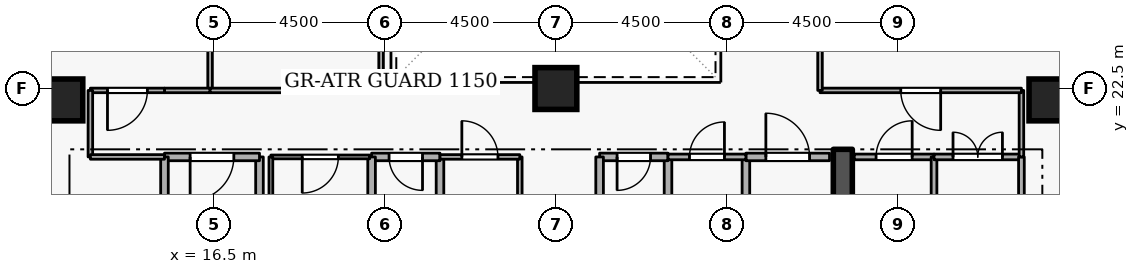
"""IFC4 building model, lengths in metres.
Left out: names, types, materials, properties, quantities, classifications, styles, units other than length and angle.
Written with IfcOpenShell. Run it as: python <this file> out.ifc"""

import sys

from ifc_helpers import new_model, si_unit, direction, frame, frame_2d, origin, origin_2d, place, context, subcontext, project, spatial, rectangle, extrude, element, fill, save


model = new_model("IFC4")
c1 = context("Model", 3, precision=1e-05, world=origin(), true_north=direction((0.0, 1.0)))
c2 = subcontext(c1, "Body", "Model", "MODEL_VIEW")
j1 = project(units=[si_unit("LENGTHUNIT", "METRE"), si_unit("PLANEANGLEUNIT", "RADIAN")], contexts=[c1])
p1 = place(None, origin())
s1 = spatial("IfcSite", under=j1, at=p1, CompositionType="ELEMENT")
p2 = place(p1, origin())
s2 = spatial("IfcBuilding", under=s1, at=p2, CompositionType="ELEMENT")
p3 = place(p2, frame((0.0, 0.0, 189.3)))
s3 = spatial("IfcBuildingStorey", under=s2, at=p3, CompositionType="ELEMENT", Elevation=189.3)
p4 = place(p3, frame((33.05, 15.1, 0.0), z_axis=(0.0, 0.0, 1.0), x_axis=(0.0, 1.0, 0.0)))
e1 = element("IfcWall", 1, at=p4, inside=s3, PredefinedType="SHEAR", context=c2, shape_type="SweptSolid", body=[
    extrude(rectangle(XDim=5.8, YDim=0.5, at=frame_2d((2.9, 0.0))), origin(), (0.0, 0.0, 1.0), 3.6),
])
for number, where, z_axis, x_axis in (
    (2, (12.5, 22.2, 0.0), (0.0, 0.0, 1.0), (1.0, 0.0, 0.0)),
    (3, (38.5, 22.2, 0.0), (0.0, 0.0, 1.0), (1.0, 0.0, 0.0)),
    (4, (25.5, 22.5, 0.0), (0.0, 0.0, 1.0), (1.0, 0.0, 0.0)),
):
    element("IfcColumn", number, at=place(p3, frame(where, z_axis=z_axis, x_axis=x_axis)), inside=s3, PredefinedType="COLUMN", context=c2, shape_type="SweptSolid", body=[
        extrude(rectangle(XDim=1.1, YDim=1.1, at=origin_2d()), origin(), (0.0, 0.0, 1.0), 3.6),
    ])
p5 = place(p3, frame((17.7, 18.4, 0.0), z_axis=(0.0, 0.0, 1.0), x_axis=(0.0, 1.0, 0.0)))
e5 = element("IfcWall", 5, at=p5, inside=s3, PredefinedType="STANDARD", context=c2, shape_type="SweptSolid", body=[
    extrude(rectangle(XDim=2.3, YDim=0.2, at=frame_2d((1.15, 0.0))), origin(), (0.0, 0.0, 1.0), 2.545),
])
p6 = place(p3, frame((17.7, 20.7, 0.0), z_axis=(0.0, 0.0, 1.0), x_axis=(-1.0, 0.0, 0.0)))
e6 = element("IfcWall", 6, at=p6, inside=s3, PredefinedType="STANDARD", context=c2, shape_type="SweptSolid", body=[
    extrude(rectangle(XDim=2.5, YDim=0.2, at=frame_2d((1.25, 0.0))), origin(), (0.0, 0.0, 1.0), 3.34),
])
p7 = place(p6, frame((0.675, 0.0, 0.0)))
e7 = element("IfcOpeningElement", 7, at=p7, cuts=e6, PredefinedType="OPENING", context=c2, shape_type="SweptSolid", body=[
    extrude(rectangle(XDim=1.15, YDim=2.1, at=frame_2d((0.575, 1.05))), frame((0.0, 0.11, 0.0), z_axis=(0.0, -1.0, 0.0), x_axis=(1.0, 0.0, 0.0)), (0.0, 0.0, 1.0), 0.22),
])
p8 = place(p3, frame((15.2, 20.7, 0.0), z_axis=(0.0, 0.0, 1.0), x_axis=(0.0, -1.0, 0.0)))
e8 = element("IfcWall", 8, at=p8, inside=s3, PredefinedType="STANDARD", context=c2, shape_type="SweptSolid", body=[
    extrude(rectangle(XDim=5.7, YDim=0.2, at=frame_2d((2.85, 0.0))), origin(), (0.0, 0.0, 1.0), 3.34),
])
p9 = place(p3, frame((28.45, 18.65, 0.0), z_axis=(0.0, 0.0, 1.0), x_axis=(0.0, 1.0, 0.0)))
e9 = element("IfcWall", 9, at=p9, inside=s3, PredefinedType="STANDARD", context=c2, shape_type="SweptSolid", body=[
    extrude(rectangle(XDim=2.05, YDim=0.2, at=frame_2d((1.025, 0.0))), origin(), (0.0, 0.0, 1.0), 3.34),
])
p10 = place(p3, frame((28.45, 20.7, 0.0), z_axis=(0.0, 0.0, 1.0), x_axis=(-1.0, 0.0, 0.0)))
e10 = element("IfcWall", 10, at=p10, inside=s3, PredefinedType="STANDARD", context=c2, shape_type="SweptSolid", body=[
    extrude(rectangle(XDim=1.8, YDim=0.2, at=frame_2d((0.9, 0.0))), origin(), (0.0, 0.0, 1.0), 3.34),
])
p11 = place(p10, frame((0.46, 0.0, 0.0)))
e11 = element("IfcOpeningElement", 11, at=p11, cuts=e10, PredefinedType="OPENING", context=c2, shape_type="SweptSolid", body=[
    extrude(rectangle(XDim=0.88, YDim=2.04, at=frame_2d((0.44, 1.02))), frame((0.0, 0.11, 0.0), z_axis=(0.0, -1.0, 0.0), x_axis=(1.0, 0.0, 0.0)), (0.0, 0.0, 1.0), 0.22),
])
for number, where, z_axis, x_axis in (
    (12, (26.65, 20.7, 0.0), (0.0, 0.0, 1.0), (0.0, -1.0, 0.0)),
    (13, (22.45, 18.65, 0.0), (0.0, 0.0, 1.0), (0.0, 1.0, 0.0)),
):
    element("IfcWall", number, at=place(p3, frame(where, z_axis=z_axis, x_axis=x_axis)), inside=s3, PredefinedType="STANDARD", context=c2, shape_type="SweptSolid", body=[
        extrude(rectangle(XDim=2.05, YDim=0.2, at=frame_2d((1.025, 0.0))), origin(), (0.0, 0.0, 1.0), 3.34),
    ])
p12 = place(p3, frame((22.45, 20.7, 0.0), z_axis=(0.0, 0.0, 1.0), x_axis=(-1.0, 0.0, 0.0)))
e14 = element("IfcWall", 14, at=p12, inside=s3, PredefinedType="STANDARD", context=c2, shape_type="SweptSolid", body=[
    extrude(rectangle(XDim=1.8, YDim=0.2, at=frame_2d((0.9, 0.0))), origin(), (0.0, 0.0, 1.0), 3.34),
])
p13 = place(p12, frame((0.46, 0.0, 0.0)))
e15 = element("IfcOpeningElement", 15, at=p13, cuts=e14, PredefinedType="OPENING", context=c2, shape_type="SweptSolid", body=[
    extrude(rectangle(XDim=0.88, YDim=2.04, at=frame_2d((0.44, 1.02))), frame((0.0, 0.11, 0.0), z_axis=(0.0, -1.0, 0.0), x_axis=(1.0, 0.0, 0.0)), (0.0, 0.0, 1.0), 0.22),
])
for number, where, z_axis, x_axis in (
    (16, (20.65, 20.7, 0.0), (0.0, 0.0, 1.0), (0.0, -1.0, 0.0)),
    (17, (30.5, 18.65, 0.0), (0.0, 0.0, 1.0), (0.0, 1.0, 0.0)),
):
    element("IfcWall", number, at=place(p3, frame(where, z_axis=z_axis, x_axis=x_axis)), inside=s3, PredefinedType="STANDARD", context=c2, shape_type="SweptSolid", body=[
        extrude(rectangle(XDim=2.05, YDim=0.2, at=frame_2d((1.025, 0.0))), origin(), (0.0, 0.0, 1.0), 3.34),
    ])
p14 = place(p3, frame((30.5, 20.7, 0.0), z_axis=(0.0, 0.0, 1.0), x_axis=(1.0, 0.0, 0.0)))
e18 = element("IfcWall", 18, at=p14, inside=s3, PredefinedType="STANDARD", context=c2, shape_type="SweptSolid", body=[
    extrude(rectangle(XDim=2.2, YDim=0.2, at=frame_2d((1.1, 0.0))), origin(), (0.0, 0.0, 1.0), 3.34),
])
p15 = place(p14, frame((0.525, 0.0, 0.0)))
e19 = element("IfcOpeningElement", 19, at=p15, cuts=e18, PredefinedType="OPENING", context=c2, shape_type="SweptSolid", body=[
    extrude(rectangle(XDim=1.15, YDim=2.1, at=frame_2d((0.575, 1.05))), frame((0.0, 0.11, 0.0), z_axis=(0.0, -1.0, 0.0), x_axis=(1.0, 0.0, 0.0)), (0.0, 0.0, 1.0), 0.22),
])
p16 = place(p3, frame((20.6, 20.7, 0.0), z_axis=(0.0, 0.0, 1.0), x_axis=(-1.0, 0.0, 0.0)))
e20 = element("IfcWall", 20, at=p16, inside=s3, PredefinedType="PARTITIONING", context=c2, shape_type="SweptSolid", body=[
    extrude(rectangle(XDim=2.6, YDim=0.1, at=frame_2d((1.3, 0.0))), origin(), (0.0, 0.0, 1.0), 3.34),
])
p17 = place(p16, frame((0.825, 0.0, 0.0)))
e21 = element("IfcOpeningElement", 21, at=p17, cuts=e20, PredefinedType="OPENING", context=c2, shape_type="SweptSolid", body=[
    extrude(rectangle(XDim=0.95, YDim=2.1, at=frame_2d((0.475, 1.05))), frame((0.0, 0.06, 0.0), z_axis=(0.0, -1.0, 0.0), x_axis=(1.0, 0.0, 0.0)), (0.0, 0.0, 1.0), 0.12),
])
p18 = place(p3, frame((18.0, 20.7, 0.0), z_axis=(0.0, 0.0, 1.0), x_axis=(0.0, -1.0, 0.0)))
e22 = element("IfcWall", 22, at=p18, inside=s3, PredefinedType="PARTITIONING", context=c2, shape_type="SweptSolid", body=[
    extrude(rectangle(XDim=2.05, YDim=0.1, at=frame_2d((1.025, 0.0))), origin(), (0.0, 0.0, 1.0), 2.545),
])
p19 = place(p3, frame((24.55, 20.7, 0.0), z_axis=(0.0, 0.0, 1.0), x_axis=(0.0, -1.0, 0.0)))
e23 = element("IfcWall", 23, at=p19, inside=s3, PredefinedType="PARTITIONING", context=c2, shape_type="SweptSolid", body=[
    extrude(rectangle(XDim=2.05, YDim=0.12, at=frame_2d((1.025, 0.0))), origin(), (0.0, 0.0, 1.0), 3.34),
])
p20 = place(p3, frame((22.45, 20.7, 0.0), z_axis=(0.0, 0.0, 1.0), x_axis=(1.0, 0.0, 0.0)))
e24 = element("IfcWall", 24, at=p20, inside=s3, PredefinedType="PARTITIONING", context=c2, shape_type="SweptSolid", body=[
    extrude(rectangle(XDim=2.1, YDim=0.12, at=frame_2d((1.05, 0.0))), origin(), (0.0, 0.0, 1.0), 3.34),
])
p21 = place(p20, frame((0.575, 0.0, 0.0)))
e25 = element("IfcOpeningElement", 25, at=p21, cuts=e24, PredefinedType="OPENING", context=c2, shape_type="SweptSolid", body=[
    extrude(rectangle(XDim=0.95, YDim=2.1, at=frame_2d((0.475, 1.05))), frame((0.0, 0.07, 0.0), z_axis=(0.0, -1.0, 0.0), x_axis=(1.0, 0.0, 0.0)), (0.0, 0.0, 1.0), 0.14),
])
p22 = place(p3, frame((28.45, 20.7, 0.0), z_axis=(0.0, 0.0, 1.0), x_axis=(1.0, 0.0, 0.0)))
e26 = element("IfcWall", 26, at=p22, inside=s3, PredefinedType="PARTITIONING", context=c2, shape_type="SweptSolid", body=[
    extrude(rectangle(XDim=2.05, YDim=0.15, at=frame_2d((1.025, 0.0))), origin(), (0.0, 0.0, 1.0), 3.34),
])
p23 = place(p22, frame((0.565, 0.0, 0.0)))
e27 = element("IfcOpeningElement", 27, at=p23, cuts=e26, PredefinedType="OPENING", context=c2, shape_type="SweptSolid", body=[
    extrude(rectangle(XDim=0.92, YDim=2.08, at=frame_2d((0.46, 1.04))), frame((0.0, 0.085, 0.0), z_axis=(0.0, -1.0, 0.0), x_axis=(1.0, 0.0, 0.0)), (0.0, 0.0, 1.0), 0.17),
])
p24 = place(p3, frame((33.35, 20.7, 0.0), z_axis=(0.0, 0.0, 1.0), x_axis=(1.0, 0.0, 0.0)))
e28 = element("IfcWall", 28, at=p24, inside=s3, PredefinedType="PARTITIONING", context=c2, shape_type="SweptSolid", body=[
    extrude(rectangle(XDim=2.1, YDim=0.15, at=frame_2d((1.05, 0.0))), origin(), (0.0, 0.0, 1.0), 3.34),
])
p25 = place(p24, frame((0.575, 0.0, 0.0)))
e29 = element("IfcOpeningElement", 29, at=p25, cuts=e28, PredefinedType="OPENING", context=c2, shape_type="SweptSolid", body=[
    extrude(rectangle(XDim=0.95, YDim=2.1, at=frame_2d((0.475, 1.05))), frame((0.0, 0.085, 0.0), z_axis=(0.0, -1.0, 0.0), x_axis=(1.0, 0.0, 0.0)), (0.0, 0.0, 1.0), 0.17),
])
p26 = place(p3, frame((35.45, 20.7, 0.0), z_axis=(0.0, 0.0, 1.0), x_axis=(0.0, -1.0, 0.0)))
e30 = element("IfcWall", 30, at=p26, inside=s3, PredefinedType="PARTITIONING", context=c2, shape_type="SweptSolid", body=[
    extrude(rectangle(XDim=5.65, YDim=0.15, at=frame_2d((2.825, 0.0))), origin(), (0.0, 0.0, 1.0), 3.34),
])
p27 = place(p3, frame((35.45, 20.7, 0.0), z_axis=(0.0, 0.0, 1.0), x_axis=(1.0, 0.0, 0.0)))
e31 = element("IfcWall", 31, at=p27, inside=s3, PredefinedType="PARTITIONING", context=c2, shape_type="SweptSolid", body=[
    extrude(rectangle(XDim=2.3, YDim=0.15, at=frame_2d((1.15, 0.0))), origin(), (0.0, 0.0, 1.0), 3.34),
])
p28 = place(p27, frame((0.5, 0.0, 0.0)))
e32 = element("IfcOpeningElement", 32, at=p28, cuts=e31, PredefinedType="OPENING", context=c2, shape_type="SweptSolid", body=[
    extrude(rectangle(XDim=1.3, YDim=2.12, at=frame_2d((0.65, 1.06))), frame((0.0, 0.085, 0.0), z_axis=(0.0, -1.0, 0.0), x_axis=(1.0, 0.0, 0.0)), (0.0, 0.0, 1.0), 0.17),
])
p29 = place(p3, frame((37.75, 20.7, 0.0), z_axis=(0.0, 0.0, 1.0), x_axis=(0.0, -1.0, 0.0)))
e33 = element("IfcWall", 33, at=p29, inside=s3, PredefinedType="PARTITIONING", context=c2, shape_type="SweptSolid", body=[
    extrude(rectangle(XDim=5.65, YDim=0.15, at=frame_2d((2.825, 0.0))), origin(), (0.0, 0.0, 1.0), 3.34),
])
p30 = place(p3, frame((16.4, 27.0, 0.0), z_axis=(0.0, 0.0, 1.0), x_axis=(0.0, -1.0, 0.0)))
e34 = element("IfcWall", 34, at=p30, inside=s3, PredefinedType="PARTITIONING", context=c2, shape_type="SweptSolid", body=[
    extrude(rectangle(XDim=4.55, YDim=0.12, at=frame_2d((2.275, 0.0))), origin(), (0.0, 0.0, 1.0), 3.34),
])
p31 = place(p3, frame((16.4, 22.45, 0.0), z_axis=(0.0, 0.0, 1.0), x_axis=(-1.0, 0.0, 0.0)))
e35 = element("IfcWall", 35, at=p31, inside=s3, PredefinedType="PARTITIONING", context=c2, shape_type="SweptSolid", body=[
    extrude(rectangle(XDim=1.2, YDim=0.12, at=frame_2d((0.6, 0.0))), origin(), (0.0, 0.0, 1.0), 3.34),
])
p32 = place(p3, frame((15.2, 22.45, 0.0), z_axis=(0.0, 0.0, 1.0), x_axis=(-1.0, 0.0, 0.0)))
e36 = element("IfcWall", 36, at=p32, inside=s3, PredefinedType="PARTITIONING", context=c2, shape_type="SweptSolid", body=[
    extrude(rectangle(XDim=1.95, YDim=0.12, at=frame_2d((0.975, 0.0))), origin(), (0.0, 0.0, 1.0), 3.34),
])
p33 = place(p32, frame((0.45, 0.0, 0.0)))
e37 = element("IfcOpeningElement", 37, at=p33, cuts=e36, PredefinedType="OPENING", context=c2, shape_type="SweptSolid", body=[
    extrude(rectangle(XDim=1.05, YDim=2.1, at=frame_2d((0.525, 1.05))), frame((0.0, 0.07, 0.0), z_axis=(0.0, -1.0, 0.0), x_axis=(1.0, 0.0, 0.0)), (0.0, 0.0, 1.0), 0.14),
])
p34 = place(p3, frame((13.25, 22.45, 0.0), z_axis=(0.0, 0.0, 1.0), x_axis=(0.0, -1.0, 0.0)))
e38 = element("IfcWall", 38, at=p34, inside=s3, PredefinedType="PARTITIONING", context=c2, shape_type="SweptSolid", body=[
    extrude(rectangle(XDim=1.75, YDim=0.12, at=frame_2d((0.875, 0.0))), origin(), (0.0, 0.0, 1.0), 3.34),
])
p35 = place(p3, frame((13.25, 20.7, 0.0), z_axis=(0.0, 0.0, 1.0), x_axis=(1.0, 0.0, 0.0)))
e39 = element("IfcWall", 39, at=p35, inside=s3, PredefinedType="PARTITIONING", context=c2, shape_type="SweptSolid", body=[
    extrude(rectangle(XDim=1.95, YDim=0.12, at=frame_2d((0.975, 0.0))), origin(), (0.0, 0.0, 1.0), 3.34),
])
p36 = place(p3, frame((20.9, 31.55, 0.0), z_axis=(0.0, 0.0, 1.0), x_axis=(0.0, -1.0, 0.0)))
e40 = element("IfcWall", 40, at=p36, inside=s3, PredefinedType="PARTITIONING", context=c2, shape_type="SweptSolid", body=[
    extrude(rectangle(XDim=9.1, YDim=0.12, at=frame_2d((4.55, 0.0))), origin(), (0.0, 0.0, 1.0), 3.34),
])
p37 = place(p3, frame((20.9, 22.45, 0.0), z_axis=(0.0, 0.0, 1.0), x_axis=(-1.0, 0.0, 0.0)))
e41 = element("IfcWall", 41, at=p37, inside=s3, PredefinedType="PARTITIONING", context=c2, shape_type="SweptSolid", body=[
    extrude(rectangle(XDim=4.5, YDim=0.12, at=frame_2d((2.25, 0.0))), origin(), (0.0, 0.0, 1.0), 3.34),
])
p38 = place(p3, frame((37.75, 20.7, 0.0), z_axis=(0.0, 0.0, 1.0), x_axis=(0.0, 1.0, 0.0)))
e42 = element("IfcWall", 42, at=p38, inside=s3, PredefinedType="PARTITIONING", context=c2, shape_type="SweptSolid", body=[
    extrude(rectangle(XDim=1.75, YDim=0.12, at=frame_2d((0.875, 0.0))), origin(), (0.0, 0.0, 1.0), 3.34),
])
p39 = place(p3, frame((37.75, 22.45, 0.0), z_axis=(0.0, 0.0, 1.0), x_axis=(-1.0, 0.0, 0.0)))
e43 = element("IfcWall", 43, at=p39, inside=s3, PredefinedType="PARTITIONING", context=c2, shape_type="SweptSolid", body=[
    extrude(rectangle(XDim=5.3, YDim=0.12, at=frame_2d((2.65, 0.0))), origin(), (0.0, 0.0, 1.0), 3.34),
])
p40 = place(p39, frame((2.125, 0.0, 0.0)))
e44 = element("IfcOpeningElement", 44, at=p40, cuts=e43, PredefinedType="OPENING", context=c2, shape_type="SweptSolid", body=[
    extrude(rectangle(XDim=1.05, YDim=2.1, at=frame_2d((0.525, 1.05))), frame((0.0, 0.07, 0.0), z_axis=(0.0, -1.0, 0.0), x_axis=(1.0, 0.0, 0.0)), (0.0, 0.0, 1.0), 0.14),
])
p41 = place(p3, frame((32.45, 22.45, 0.0), z_axis=(0.0, 0.0, 1.0), x_axis=(0.0, 1.0, 0.0)))
e45 = element("IfcWall", 45, at=p41, inside=s3, PredefinedType="PARTITIONING", context=c2, shape_type="SweptSolid", body=[
    extrude(rectangle(XDim=2.95, YDim=0.12, at=frame_2d((1.475, 0.0))), origin(), (0.0, 0.0, 1.0), 3.34),
])
p42 = place(p7, origin())
e46 = element("IfcDoor", 46, at=p42, inside=s3, OperationType="SINGLE_SWING_RIGHT", PredefinedType="DOOR", context=c2, shape_type="SweptSolid", body=[
    extrude(rectangle(XDim=1.15, YDim=2.1, at=frame_2d((0.575, 1.05))), frame((0.0, 0.025, 0.0), z_axis=(0.0, -1.0, 0.0), x_axis=(1.0, 0.0, 0.0)), (0.0, 0.0, 1.0), 0.05),
])
fill(e7, e46)
p43 = place(p11, origin())
e47 = element("IfcDoor", 47, at=p43, inside=s3, OperationType="SINGLE_SWING_RIGHT", PredefinedType="DOOR", context=c2, shape_type="SweptSolid", body=[
    extrude(rectangle(XDim=0.88, YDim=2.04, at=frame_2d((0.44, 1.02))), frame((0.0, 0.025, 0.0), z_axis=(0.0, -1.0, 0.0), x_axis=(1.0, 0.0, 0.0)), (0.0, 0.0, 1.0), 0.05),
])
fill(e11, e47)
p44 = place(p13, origin())
e48 = element("IfcDoor", 48, at=p44, inside=s3, OperationType="SINGLE_SWING_LEFT", PredefinedType="DOOR", context=c2, shape_type="SweptSolid", body=[
    extrude(rectangle(XDim=0.88, YDim=2.04, at=frame_2d((0.44, 1.02))), frame((0.0, 0.025, 0.0), z_axis=(0.0, -1.0, 0.0), x_axis=(1.0, 0.0, 0.0)), (0.0, 0.0, 1.0), 0.05),
])
fill(e15, e48)
p45 = place(p17, origin())
e49 = element("IfcDoor", 49, at=p45, inside=s3, OperationType="SINGLE_SWING_RIGHT", PredefinedType="DOOR", context=c2, shape_type="SweptSolid", body=[
    extrude(rectangle(XDim=0.95, YDim=2.1, at=frame_2d((0.475, 1.05))), frame((0.0, 0.025, 0.0), z_axis=(0.0, -1.0, 0.0), x_axis=(1.0, 0.0, 0.0)), (0.0, 0.0, 1.0), 0.05),
])
fill(e21, e49)
p46 = place(p21, origin())
e50 = element("IfcDoor", 50, at=p46, inside=s3, OperationType="SINGLE_SWING_LEFT", PredefinedType="DOOR", context=c2, shape_type="SweptSolid", body=[
    extrude(rectangle(XDim=0.95, YDim=2.1, at=frame_2d((0.475, 1.05))), frame((0.0, 0.025, 0.0), z_axis=(0.0, -1.0, 0.0), x_axis=(1.0, 0.0, 0.0)), (0.0, 0.0, 1.0), 0.05),
])
fill(e25, e50)
p47 = place(p23, origin())
e51 = element("IfcDoor", 51, at=p47, inside=s3, OperationType="SINGLE_SWING_RIGHT", PredefinedType="DOOR", context=c2, shape_type="SweptSolid", body=[
    extrude(rectangle(XDim=0.92, YDim=2.08, at=frame_2d((0.46, 1.04))), frame((0.0, 0.025, 0.0), z_axis=(0.0, -1.0, 0.0), x_axis=(1.0, 0.0, 0.0)), (0.0, 0.0, 1.0), 0.05),
])
fill(e27, e51)
p48 = place(p15, origin())
e52 = element("IfcDoor", 52, at=p48, inside=s3, OperationType="SINGLE_SWING_LEFT", PredefinedType="DOOR", context=c2, shape_type="SweptSolid", body=[
    extrude(rectangle(XDim=1.15, YDim=2.1, at=frame_2d((0.575, 1.05))), frame((0.0, 0.025, 0.0), z_axis=(0.0, -1.0, 0.0), x_axis=(1.0, 0.0, 0.0)), (0.0, 0.0, 1.0), 0.05),
])
fill(e19, e52)
p49 = place(p25, origin())
e53 = element("IfcDoor", 53, at=p49, inside=s3, OperationType="SINGLE_SWING_RIGHT", PredefinedType="DOOR", context=c2, shape_type="SweptSolid", body=[
    extrude(rectangle(XDim=0.95, YDim=2.1, at=frame_2d((0.475, 1.05))), frame((0.0, 0.025, 0.0), z_axis=(0.0, -1.0, 0.0), x_axis=(1.0, 0.0, 0.0)), (0.0, 0.0, 1.0), 0.05),
])
fill(e29, e53)
p50 = place(p28, origin())
e54 = element("IfcDoor", 54, at=p50, inside=s3, OperationType="DOUBLE_DOOR_SINGLE_SWING", PredefinedType="DOOR", context=c2, shape_type="SweptSolid", body=[
    extrude(rectangle(XDim=1.3, YDim=2.12, at=frame_2d((0.65, 1.06))), frame((0.0, 0.025, 0.0), z_axis=(0.0, -1.0, 0.0), x_axis=(1.0, 0.0, 0.0)), (0.0, 0.0, 1.0), 0.05),
])
fill(e32, e54)
p51 = place(p33, origin())
e55 = element("IfcDoor", 55, at=p51, inside=s3, OperationType="SINGLE_SWING_RIGHT", PredefinedType="DOOR", context=c2, shape_type="SweptSolid", body=[
    extrude(rectangle(XDim=1.05, YDim=2.1, at=frame_2d((0.525, 1.05))), frame((0.0, 0.025, 0.0), z_axis=(0.0, -1.0, 0.0), x_axis=(1.0, 0.0, 0.0)), (0.0, 0.0, 1.0), 0.05),
])
fill(e37, e55)
p52 = place(p40, origin())
e56 = element("IfcDoor", 56, at=p52, inside=s3, OperationType="SINGLE_SWING_LEFT", PredefinedType="DOOR", context=c2, shape_type="SweptSolid", body=[
    extrude(rectangle(XDim=1.05, YDim=2.1, at=frame_2d((0.525, 1.05))), frame((0.0, 0.025, 0.0), z_axis=(0.0, -1.0, 0.0), x_axis=(1.0, 0.0, 0.0)), (0.0, 0.0, 1.0), 0.05),
])
fill(e44, e56)
save(model, sys.argv[1])
